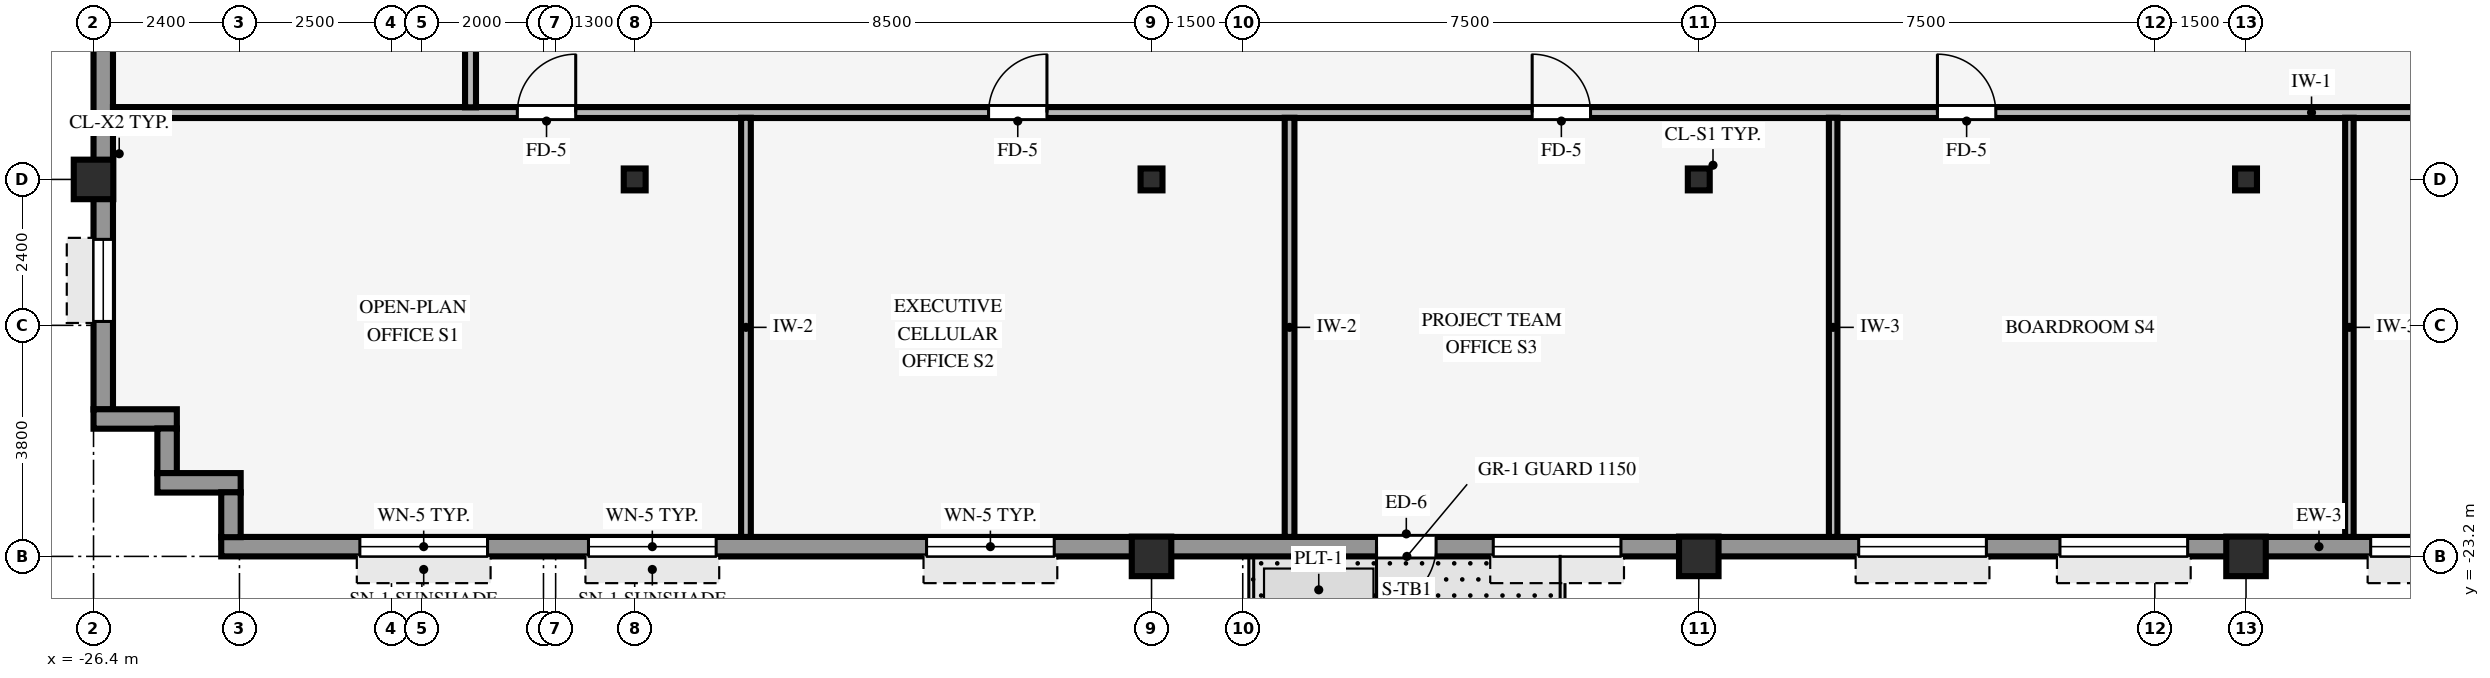
"""IFC4 building model, lengths in metres.
Left out: names, types, materials, properties, quantities, classifications, styles, units other than length and angle.
Written with IfcOpenShell. Run it as: python <this file> out.ifc"""

import sys

from ifc_helpers import new_model, si_unit, direction, frame, frame_2d, origin, origin_2d, place, context, subcontext, project, spatial, rectangle, hollow_rectangle, i_section, extrude, source, transform, mapped, element, fill, save


model = new_model("IFC4")
c1 = context("Model", 3, precision=1e-05, world=origin(), true_north=direction((0.0, 1.0)))
c2 = subcontext(c1, "Body", "Model", "MODEL_VIEW")
j1 = project(units=[si_unit("LENGTHUNIT", "METRE"), si_unit("PLANEANGLEUNIT", "RADIAN")], contexts=[c1])
p1 = place(None, origin())
s1 = spatial("IfcSite", under=j1, at=p1, CompositionType="ELEMENT")
p2 = place(p1, origin())
s2 = spatial("IfcBuilding", under=s1, at=p2, CompositionType="ELEMENT")
p3 = place(p2, frame((0.0, 0.0, 160.35)))
s3 = spatial("IfcBuildingStorey", under=s2, at=p3, CompositionType="ELEMENT", Elevation=160.35)
for number, where, z_axis, x_axis in (
    (1, (-26.4, -17.0, 0.0), (0.0, 0.0, 1.0), (1.0, 0.0, 0.0)),
    (2, (-9.0, -23.2, 0.0), (0.0, 0.0, 1.0), (1.0, 0.0, 0.0)),
    (3, (0.0, -23.2, 0.0), (0.0, 0.0, 1.0), (1.0, 0.0, 0.0)),
    (4, (9.0, -23.2, 0.0), (0.0, 0.0, 1.0), (1.0, 0.0, 0.0)),
):
    element("IfcColumn", number, at=place(p3, frame(where, z_axis=z_axis, x_axis=x_axis)), inside=s3, PredefinedType="COLUMN", context=c2, shape_type="SweptSolid", body=[
        extrude(hollow_rectangle(XDim=0.65, YDim=0.65, WallThickness=0.04, InnerFilletRadius=0.04, OuterFilletRadius=0.08, at=origin_2d()), origin(), (0.0, 0.0, 1.0), 3.37),
    ])
for number, where, z_axis, x_axis in (
    (5, (0.0, -17.0, 0.0), (0.0, 0.0, 1.0), (1.0, 0.0, 0.0)),
    (6, (-17.5, -17.0, 0.0), (0.0, 0.0, 1.0), (1.0, 0.0, 0.0)),
    (7, (-9.0, -17.0, 0.0), (0.0, 0.0, 1.0), (1.0, 0.0, 0.0)),
    (8, (9.0, -17.0, 0.0), (0.0, 0.0, 1.0), (1.0, 0.0, 0.0)),
):
    element("IfcColumn", number, at=place(p3, frame(where, z_axis=z_axis, x_axis=x_axis)), inside=s3, PredefinedType="COLUMN", context=c2, shape_type="SweptSolid", body=[
        extrude(i_section(OverallWidth=0.36, OverallDepth=0.36, WebThickness=0.021, FlangeThickness=0.021, FilletRadius=0.018, at=origin_2d()), origin(), (0.0, 0.0, 1.0), 3.37),
    ])
p4 = place(p3, frame((-24.3, -23.04, 0.0), z_axis=(0.0, 0.0, 1.0), x_axis=(1.0, 0.0, 0.0)))
e9 = element("IfcWall", 9, at=p4, inside=s3, PredefinedType="STANDARD", context=c2, shape_type="SweptSolid", body=[
    extrude(rectangle(XDim=48.6, YDim=0.32, at=frame_2d((24.3, 0.0))), origin(), (0.0, 0.0, 1.0), 2.705),
])
p5 = place(p4, frame((19.98, 0.0, 0.0), z_axis=(0.0, 0.0, 1.0), x_axis=(-1.0, 0.0, 0.0)))
e10 = element("IfcOpeningElement", 10, at=p5, cuts=e9, PredefinedType="OPENING", context=c2, shape_type="SweptSolid", body=[
    extrude(rectangle(XDim=0.98, YDim=2.15, at=frame_2d((0.49, 1.075))), frame((0.0, 0.17, 0.0), z_axis=(0.0, -1.0, 0.0), x_axis=(1.0, 0.0, 0.0)), (0.0, 0.0, 1.0), 0.34),
])
p6 = place(p4, frame((2.28, 0.0, 0.8)))
e11 = element("IfcOpeningElement", 11, at=p6, cuts=e9, PredefinedType="OPENING", context=c2, shape_type="SweptSolid", body=[
    extrude(rectangle(XDim=2.1, YDim=1.56, at=frame_2d((1.05, 0.78))), frame((0.0, 0.17, 0.0), z_axis=(0.0, -1.0, 0.0), x_axis=(1.0, 0.0, 0.0)), (0.0, 0.0, 1.0), 0.34),
])
p7 = place(p4, frame((6.04, 0.0, 0.8)))
e12 = element("IfcOpeningElement", 12, at=p7, cuts=e9, PredefinedType="OPENING", context=c2, shape_type="SweptSolid", body=[
    extrude(rectangle(XDim=2.1, YDim=1.56, at=frame_2d((1.05, 0.78))), frame((0.0, 0.17, 0.0), z_axis=(0.0, -1.0, 0.0), x_axis=(1.0, 0.0, 0.0)), (0.0, 0.0, 1.0), 0.34),
])
p8 = place(p4, frame((11.6, 0.0, 0.8)))
e13 = element("IfcOpeningElement", 13, at=p8, cuts=e9, PredefinedType="OPENING", context=c2, shape_type="SweptSolid", body=[
    extrude(rectangle(XDim=2.1, YDim=1.56, at=frame_2d((1.05, 0.78))), frame((0.0, 0.17, 0.0), z_axis=(0.0, -1.0, 0.0), x_axis=(1.0, 0.0, 0.0)), (0.0, 0.0, 1.0), 0.34),
])
p9 = place(p4, frame((20.92, 0.0, 0.8)))
e14 = element("IfcOpeningElement", 14, at=p9, cuts=e9, PredefinedType="OPENING", context=c2, shape_type="SweptSolid", body=[
    extrude(rectangle(XDim=2.1, YDim=1.56, at=frame_2d((1.05, 0.78))), frame((0.0, 0.17, 0.0), z_axis=(0.0, -1.0, 0.0), x_axis=(1.0, 0.0, 0.0)), (0.0, 0.0, 1.0), 0.34),
])
p10 = place(p4, frame((26.93, 0.0, 0.8)))
e15 = element("IfcOpeningElement", 15, at=p10, cuts=e9, PredefinedType="OPENING", context=c2, shape_type="SweptSolid", body=[
    extrude(rectangle(XDim=2.1, YDim=1.56, at=frame_2d((1.05, 0.78))), frame((0.0, 0.17, 0.0), z_axis=(0.0, -1.0, 0.0), x_axis=(1.0, 0.0, 0.0)), (0.0, 0.0, 1.0), 0.34),
])
p11 = place(p4, frame((30.24, 0.0, 0.8)))
e16 = element("IfcOpeningElement", 16, at=p11, cuts=e9, PredefinedType="OPENING", context=c2, shape_type="SweptSolid", body=[
    extrude(rectangle(XDim=2.1, YDim=1.56, at=frame_2d((1.05, 0.78))), frame((0.0, 0.17, 0.0), z_axis=(0.0, -1.0, 0.0), x_axis=(1.0, 0.0, 0.0)), (0.0, 0.0, 1.0), 0.34),
])
p12 = place(p4, frame((35.35, 0.0, 0.8)))
e17 = element("IfcOpeningElement", 17, at=p12, cuts=e9, PredefinedType="OPENING", context=c2, shape_type="SweptSolid", body=[
    extrude(rectangle(XDim=2.1, YDim=1.56, at=frame_2d((1.05, 0.78))), frame((0.0, 0.17, 0.0), z_axis=(0.0, -1.0, 0.0), x_axis=(1.0, 0.0, 0.0)), (0.0, 0.0, 1.0), 0.34),
])
p13 = place(p4, frame((39.56, 0.0, 0.8)))
e18 = element("IfcOpeningElement", 18, at=p13, cuts=e9, PredefinedType="OPENING", context=c2, shape_type="SweptSolid", body=[
    extrude(rectangle(XDim=2.1, YDim=1.56, at=frame_2d((1.05, 0.78))), frame((0.0, 0.17, 0.0), z_axis=(0.0, -1.0, 0.0), x_axis=(1.0, 0.0, 0.0)), (0.0, 0.0, 1.0), 0.34),
])
p14 = place(p4, frame((44.22, 0.0, 0.8)))
e19 = element("IfcOpeningElement", 19, at=p14, cuts=e9, PredefinedType="OPENING", context=c2, shape_type="SweptSolid", body=[
    extrude(rectangle(XDim=2.1, YDim=1.56, at=frame_2d((1.05, 0.78))), frame((0.0, 0.17, 0.0), z_axis=(0.0, -1.0, 0.0), x_axis=(1.0, 0.0, 0.0)), (0.0, 0.0, 1.0), 0.34),
])
p15 = place(p3, frame((-26.24, -20.784, 0.0), z_axis=(0.0, 0.0, 1.0), x_axis=(0.0, 1.0, 0.0)))
e20 = element("IfcWall", 20, at=p15, inside=s3, PredefinedType="STANDARD", context=c2, shape_type="SweptSolid", body=[
    extrude(rectangle(XDim=41.568, YDim=0.32, at=frame_2d((20.784, 0.0))), origin(), (0.0, 0.0, 1.0), 2.705),
])
p16 = place(p15, frame((1.448, 0.0, 0.8)))
e21 = element("IfcOpeningElement", 21, at=p16, cuts=e20, PredefinedType="OPENING", context=c2, shape_type="SweptSolid", body=[
    extrude(rectangle(XDim=1.35, YDim=1.56, at=frame_2d((0.675, 0.78))), frame((0.0, 0.17, 0.0), z_axis=(0.0, -1.0, 0.0), x_axis=(1.0, 0.0, 0.0)), (0.0, 0.0, 1.0), 0.34),
])
p17 = place(p15, frame((7.744, 0.0, 0.8)))
e22 = element("IfcOpeningElement", 22, at=p17, cuts=e20, PredefinedType="OPENING", context=c2, shape_type="SweptSolid", body=[
    extrude(rectangle(XDim=1.35, YDim=1.56, at=frame_2d((0.675, 0.78))), frame((0.0, 0.17, 0.0), z_axis=(0.0, -1.0, 0.0), x_axis=(1.0, 0.0, 0.0)), (0.0, 0.0, 1.0), 0.34),
])
p18 = place(p15, frame((13.14, 0.0, 0.8)))
e23 = element("IfcOpeningElement", 23, at=p18, cuts=e20, PredefinedType="OPENING", context=c2, shape_type="SweptSolid", body=[
    extrude(rectangle(XDim=1.35, YDim=1.56, at=frame_2d((0.675, 0.78))), frame((0.0, 0.17, 0.0), z_axis=(0.0, -1.0, 0.0), x_axis=(1.0, 0.0, 0.0)), (0.0, 0.0, 1.0), 0.34),
])
p19 = place(p15, frame((17.636, 0.0, 0.8)))
e24 = element("IfcOpeningElement", 24, at=p19, cuts=e20, PredefinedType="OPENING", context=c2, shape_type="SweptSolid", body=[
    extrude(rectangle(XDim=1.35, YDim=1.56, at=frame_2d((0.675, 0.78))), frame((0.0, 0.17, 0.0), z_axis=(0.0, -1.0, 0.0), x_axis=(1.0, 0.0, 0.0)), (0.0, 0.0, 1.0), 0.34),
])
p20 = place(p15, frame((22.582, 0.0, 0.8)))
e25 = element("IfcOpeningElement", 25, at=p20, cuts=e20, PredefinedType="OPENING", context=c2, shape_type="SweptSolid", body=[
    extrude(rectangle(XDim=1.35, YDim=1.56, at=frame_2d((0.675, 0.78))), frame((0.0, 0.17, 0.0), z_axis=(0.0, -1.0, 0.0), x_axis=(1.0, 0.0, 0.0)), (0.0, 0.0, 1.0), 0.34),
])
p21 = place(p15, frame((27.078, 0.0, 0.8)))
e26 = element("IfcOpeningElement", 26, at=p21, cuts=e20, PredefinedType="OPENING", context=c2, shape_type="SweptSolid", body=[
    extrude(rectangle(XDim=1.35, YDim=1.56, at=frame_2d((0.675, 0.78))), frame((0.0, 0.17, 0.0), z_axis=(0.0, -1.0, 0.0), x_axis=(1.0, 0.0, 0.0)), (0.0, 0.0, 1.0), 0.34),
])
p22 = place(p15, frame((32.474, 0.0, 0.8)))
e27 = element("IfcOpeningElement", 27, at=p22, cuts=e20, PredefinedType="OPENING", context=c2, shape_type="SweptSolid", body=[
    extrude(rectangle(XDim=1.35, YDim=1.56, at=frame_2d((0.675, 0.78))), frame((0.0, 0.17, 0.0), z_axis=(0.0, -1.0, 0.0), x_axis=(1.0, 0.0, 0.0)), (0.0, 0.0, 1.0), 0.34),
])
p23 = place(p15, frame((38.77, 0.0, 0.8)))
e28 = element("IfcOpeningElement", 28, at=p23, cuts=e20, PredefinedType="OPENING", context=c2, shape_type="SweptSolid", body=[
    extrude(rectangle(XDim=1.35, YDim=1.56, at=frame_2d((0.675, 0.78))), frame((0.0, 0.17, 0.0), z_axis=(0.0, -1.0, 0.0), x_axis=(1.0, 0.0, 0.0)), (0.0, 0.0, 1.0), 0.34),
])
p24 = place(p3, frame((-26.4, -20.94, 0.0), z_axis=(0.0, 0.0, 1.0), x_axis=(1.0, 0.0, 0.0)))
e29 = element("IfcWall", 29, at=p24, inside=s3, PredefinedType="STANDARD", context=c2, shape_type="SweptSolid", body=[
    extrude(rectangle(XDim=1.37, YDim=0.32, at=frame_2d((0.685, 0.0))), origin(), (0.0, 0.0, 1.0), 3.36),
])
p25 = place(p3, frame((-25.19, -21.834, 0.0), z_axis=(0.0, 0.0, 1.0), x_axis=(0.0, 1.0, 0.0)))
e30 = element("IfcWall", 30, at=p25, inside=s3, PredefinedType="STANDARD", context=c2, shape_type="SweptSolid", body=[
    extrude(rectangle(XDim=0.738, YDim=0.32, at=frame_2d((0.369, 0.0))), origin(), (0.0, 0.0, 1.0), 3.36),
])
p26 = place(p3, frame((-25.35, -21.99, 0.0), z_axis=(0.0, 0.0, 1.0), x_axis=(1.0, 0.0, 0.0)))
e31 = element("IfcWall", 31, at=p26, inside=s3, PredefinedType="STANDARD", context=c2, shape_type="SweptSolid", body=[
    extrude(rectangle(XDim=1.37, YDim=0.32, at=frame_2d((0.685, 0.0))), origin(), (0.0, 0.0, 1.0), 3.36),
])
p27 = place(p3, frame((-24.14, -22.884, 0.0), z_axis=(0.0, 0.0, 1.0), x_axis=(0.0, 1.0, 0.0)))
e32 = element("IfcWall", 32, at=p27, inside=s3, PredefinedType="STANDARD", context=c2, shape_type="SweptSolid", body=[
    extrude(rectangle(XDim=0.738, YDim=0.32, at=frame_2d((0.369, 0.0))), origin(), (0.0, 0.0, 1.0), 3.36),
])
p28 = place(p3, frame((-26.08, -15.9, 0.0), z_axis=(0.0, 0.0, 1.0), x_axis=(1.0, 0.0, 0.0)))
e33 = element("IfcWall", 33, at=p28, inside=s3, PredefinedType="PARTITIONING", context=c2, shape_type="SweptSolid", body=[
    extrude(rectangle(XDim=52.16, YDim=0.18, at=frame_2d((26.08, 0.0))), origin(), (0.0, 0.0, 1.0), 3.36),
])
p29 = place(p28, frame((41.35, 0.0, 0.0)))
e34 = element("IfcOpeningElement", 34, at=p29, cuts=e33, PredefinedType="OPENING", context=c2, shape_type="SweptSolid", body=[
    extrude(rectangle(XDim=0.96, YDim=2.1, at=frame_2d((0.48, 1.05))), frame((0.0, 0.1, 0.0), z_axis=(0.0, -1.0, 0.0), x_axis=(1.0, 0.0, 0.0)), (0.0, 0.0, 1.0), 0.2),
])
p30 = place(p28, frame((23.34, 0.0, 0.0)))
e35 = element("IfcOpeningElement", 35, at=p30, cuts=e33, PredefinedType="OPENING", context=c2, shape_type="SweptSolid", body=[
    extrude(rectangle(XDim=0.96, YDim=2.1, at=frame_2d((0.48, 1.05))), frame((0.0, 0.1, 0.0), z_axis=(0.0, -1.0, 0.0), x_axis=(1.0, 0.0, 0.0)), (0.0, 0.0, 1.0), 0.2),
])
p31 = place(p28, frame((14.4, 0.0, 0.0)))
e36 = element("IfcOpeningElement", 36, at=p31, cuts=e33, PredefinedType="OPENING", context=c2, shape_type="SweptSolid", body=[
    extrude(rectangle(XDim=0.96, YDim=2.1, at=frame_2d((0.48, 1.05))), frame((0.0, 0.1, 0.0), z_axis=(0.0, -1.0, 0.0), x_axis=(1.0, 0.0, 0.0)), (0.0, 0.0, 1.0), 0.2),
])
p32 = place(p28, frame((30.005, 0.0, 0.0)))
e37 = element("IfcOpeningElement", 37, at=p32, cuts=e33, PredefinedType="OPENING", context=c2, shape_type="SweptSolid", body=[
    extrude(rectangle(XDim=0.96, YDim=2.1, at=frame_2d((0.48, 1.05))), frame((0.0, 0.1, 0.0), z_axis=(0.0, -1.0, 0.0), x_axis=(1.0, 0.0, 0.0)), (0.0, 0.0, 1.0), 0.2),
])
p33 = place(p28, frame((6.65, 0.0, 0.0)))
e38 = element("IfcOpeningElement", 38, at=p33, cuts=e33, PredefinedType="OPENING", context=c2, shape_type="SweptSolid", body=[
    extrude(rectangle(XDim=0.96, YDim=2.1, at=frame_2d((0.48, 1.05))), frame((0.0, 0.1, 0.0), z_axis=(0.0, -1.0, 0.0), x_axis=(1.0, 0.0, 0.0)), (0.0, 0.0, 1.0), 0.2),
])
p34 = place(p3, frame((-20.2, -15.814, 0.0), z_axis=(0.0, 0.0, 1.0), x_axis=(0.0, 1.0, 0.0)))
e39 = element("IfcWall", 39, at=p34, inside=s3, PredefinedType="PARTITIONING", context=c2, shape_type="SweptSolid", body=[
    extrude(rectangle(XDim=31.628, YDim=0.18, at=frame_2d((15.814, 0.0))), origin(), (0.0, 0.0, 1.0), 3.36),
])
p35 = place(p34, frame((11.434, 0.0, 0.0)))
e40 = element("IfcOpeningElement", 40, at=p35, cuts=e39, PredefinedType="OPENING", context=c2, shape_type="SweptSolid", body=[
    extrude(rectangle(XDim=0.96, YDim=2.1, at=frame_2d((0.48, 1.05))), frame((0.0, 0.1, 0.0), z_axis=(0.0, -1.0, 0.0), x_axis=(1.0, 0.0, 0.0)), (0.0, 0.0, 1.0), 0.2),
])
p36 = place(p34, frame((19.634, 0.0, 0.0)))
e41 = element("IfcOpeningElement", 41, at=p36, cuts=e39, PredefinedType="OPENING", context=c2, shape_type="SweptSolid", body=[
    extrude(rectangle(XDim=0.96, YDim=2.1, at=frame_2d((0.48, 1.05))), frame((0.0, 0.1, 0.0), z_axis=(0.0, -1.0, 0.0), x_axis=(1.0, 0.0, 0.0)), (0.0, 0.0, 1.0), 0.2),
])
p37 = place(p34, frame((4.484, 0.0, 0.0)))
e42 = element("IfcOpeningElement", 42, at=p37, cuts=e39, PredefinedType="OPENING", context=c2, shape_type="SweptSolid", body=[
    extrude(rectangle(XDim=0.96, YDim=2.1, at=frame_2d((0.48, 1.05))), frame((0.0, 0.1, 0.0), z_axis=(0.0, -1.0, 0.0), x_axis=(1.0, 0.0, 0.0)), (0.0, 0.0, 1.0), 0.2),
])
p38 = place(p34, frame((26.184, 0.0, 0.0)))
e43 = element("IfcOpeningElement", 43, at=p38, cuts=e39, PredefinedType="OPENING", context=c2, shape_type="SweptSolid", body=[
    extrude(rectangle(XDim=0.96, YDim=2.1, at=frame_2d((0.48, 1.05))), frame((0.0, 0.1, 0.0), z_axis=(0.0, -1.0, 0.0), x_axis=(1.0, 0.0, 0.0)), (0.0, 0.0, 1.0), 0.2),
])
for number, where, z_axis, x_axis in (
    (44, (-15.67, -22.88, 0.0), (0.0, 0.0, 1.0), (0.0, 1.0, 0.0)),
    (45, (-6.73, -22.88, 0.0), (0.0, 0.0, 1.0), (0.0, 1.0, 0.0)),
):
    element("IfcWall", number, at=place(p3, frame(where, z_axis=z_axis, x_axis=x_axis)), inside=s3, PredefinedType="PARTITIONING", context=c2, shape_type="SweptSolid", body=[
        extrude(rectangle(XDim=6.894, YDim=0.16, at=frame_2d((3.447, 0.0))), origin(), (0.0, 0.0, 1.0), 3.36),
    ])
for number, where, z_axis, x_axis in (
    (46, (2.21, -22.88, 0.0), (0.0, 0.0, 1.0), (0.0, 1.0, 0.0)),
    (47, (10.7, -22.88, 0.0), (0.0, 0.0, 1.0), (0.0, 1.0, 0.0)),
):
    element("IfcWall", number, at=place(p3, frame(where, z_axis=z_axis, x_axis=x_axis)), inside=s3, PredefinedType="PARTITIONING", context=c2, shape_type="SweptSolid", body=[
        extrude(rectangle(XDim=6.894, YDim=0.14, at=frame_2d((3.447, 0.0))), origin(), (0.0, 0.0, 1.0), 3.36),
    ])
m1 = source(origin(), c2, "Body", "SweptSolid", [
    extrude(rectangle(XDim=0.98, YDim=2.15, at=frame_2d((0.49, 1.075))), frame((0.0, 0.025, 0.0), z_axis=(0.0, -1.0, 0.0), x_axis=(1.0, 0.0, 0.0)), (0.0, 0.0, 1.0), 0.05),
])
p39 = place(p5, origin())
e48 = element("IfcDoor", 48, at=p39, inside=s3, OperationType="SINGLE_SWING_RIGHT", PredefinedType="DOOR", context=c2, shape_type="MappedRepresentation", body=[
    mapped(m1, transform((0.0, 0.0, 0.0), scale=1.0)),
])
fill(e10, e48)
m2 = source(origin(), c2, "Body", "SweptSolid", [
    extrude(rectangle(XDim=2.1, YDim=1.56, at=frame_2d((1.05, 0.78))), frame((0.0, 0.03, 0.0), z_axis=(0.0, -1.0, 0.0), x_axis=(1.0, 0.0, 0.0)), (0.0, 0.0, 1.0), 0.06),
])
p40 = place(p6, origin())
e49 = element("IfcWindow", 49, at=p40, inside=s3, PartitioningType="SINGLE_PANEL", PredefinedType="WINDOW", context=c2, shape_type="MappedRepresentation", body=[
    mapped(m2, transform((0.0, 0.0, 0.0), scale=1.0)),
])
fill(e11, e49)
p41 = place(p7, origin())
e50 = element("IfcWindow", 50, at=p41, inside=s3, PartitioningType="SINGLE_PANEL", PredefinedType="WINDOW", context=c2, shape_type="MappedRepresentation", body=[
    mapped(m2, transform((0.0, 0.0, 0.0), scale=1.0)),
])
fill(e12, e50)
p42 = place(p8, origin())
e51 = element("IfcWindow", 51, at=p42, inside=s3, PartitioningType="SINGLE_PANEL", PredefinedType="WINDOW", context=c2, shape_type="MappedRepresentation", body=[
    mapped(m2, transform((0.0, 0.0, 0.0), scale=1.0)),
])
fill(e13, e51)
p43 = place(p9, origin())
e52 = element("IfcWindow", 52, at=p43, inside=s3, PartitioningType="SINGLE_PANEL", PredefinedType="WINDOW", context=c2, shape_type="MappedRepresentation", body=[
    mapped(m2, transform((0.0, 0.0, 0.0), scale=1.0)),
])
fill(e14, e52)
p44 = place(p10, origin())
e53 = element("IfcWindow", 53, at=p44, inside=s3, PartitioningType="SINGLE_PANEL", PredefinedType="WINDOW", context=c2, shape_type="MappedRepresentation", body=[
    mapped(m2, transform((0.0, 0.0, 0.0), scale=1.0)),
])
fill(e15, e53)
p45 = place(p11, origin())
e54 = element("IfcWindow", 54, at=p45, inside=s3, PartitioningType="SINGLE_PANEL", PredefinedType="WINDOW", context=c2, shape_type="MappedRepresentation", body=[
    mapped(m2, transform((0.0, 0.0, 0.0), scale=1.0)),
])
fill(e16, e54)
p46 = place(p12, origin())
e55 = element("IfcWindow", 55, at=p46, inside=s3, PartitioningType="SINGLE_PANEL", PredefinedType="WINDOW", context=c2, shape_type="MappedRepresentation", body=[
    mapped(m2, transform((0.0, 0.0, 0.0), scale=1.0)),
])
fill(e17, e55)
m3 = source(origin(), c2, "Body", "SweptSolid", [
    extrude(rectangle(XDim=1.35, YDim=1.56, at=frame_2d((0.675, 0.78))), frame((0.0, 0.03, 0.0), z_axis=(0.0, -1.0, 0.0), x_axis=(1.0, 0.0, 0.0)), (0.0, 0.0, 1.0), 0.06),
])
p47 = place(p16, origin())
e56 = element("IfcWindow", 56, at=p47, inside=s3, PartitioningType="SINGLE_PANEL", PredefinedType="WINDOW", context=c2, shape_type="MappedRepresentation", body=[
    mapped(m3, transform((0.0, 0.0, 0.0), scale=1.0)),
])
fill(e21, e56)
m4 = source(origin(), c2, "Body", "SweptSolid", [
    extrude(rectangle(XDim=0.96, YDim=2.1, at=frame_2d((0.48, 1.05))), frame((0.0, 0.025, 0.0), z_axis=(0.0, -1.0, 0.0), x_axis=(1.0, 0.0, 0.0)), (0.0, 0.0, 1.0), 0.05),
])
p48 = place(p30, origin())
e57 = element("IfcDoor", 57, at=p48, inside=s3, OperationType="SINGLE_SWING_LEFT", PredefinedType="DOOR", context=c2, shape_type="MappedRepresentation", body=[
    mapped(m4, transform((0.0, 0.0, 0.0), scale=1.0)),
])
fill(e35, e57)
p49 = place(p31, origin())
e58 = element("IfcDoor", 58, at=p49, inside=s3, OperationType="SINGLE_SWING_RIGHT", PredefinedType="DOOR", context=c2, shape_type="MappedRepresentation", body=[
    mapped(m4, transform((0.0, 0.0, 0.0), scale=1.0)),
])
fill(e36, e58)
p50 = place(p32, origin())
e59 = element("IfcDoor", 59, at=p50, inside=s3, OperationType="SINGLE_SWING_LEFT", PredefinedType="DOOR", context=c2, shape_type="MappedRepresentation", body=[
    mapped(m4, transform((0.0, 0.0, 0.0), scale=1.0)),
])
fill(e37, e59)
p51 = place(p33, origin())
e60 = element("IfcDoor", 60, at=p51, inside=s3, OperationType="SINGLE_SWING_RIGHT", PredefinedType="DOOR", context=c2, shape_type="MappedRepresentation", body=[
    mapped(m4, transform((0.0, 0.0, 0.0), scale=1.0)),
])
fill(e38, e60)
save(model, sys.argv[1])
